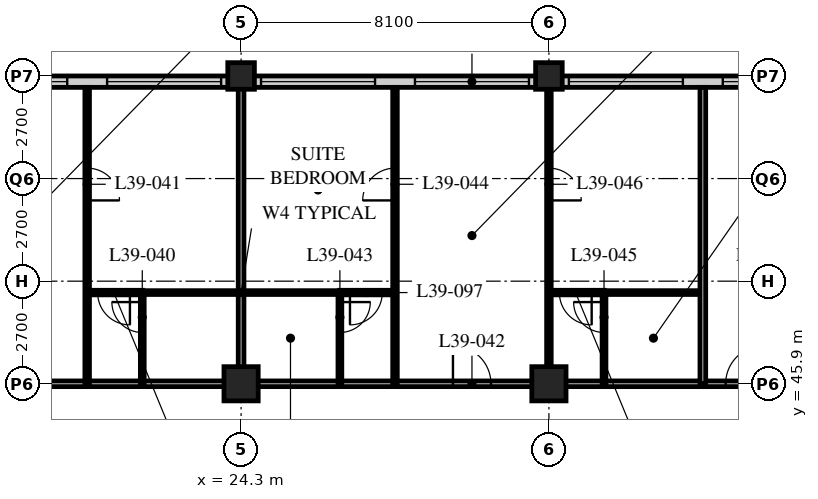
"""IFC4 building model, lengths in metres.
Left out: names, types, materials, properties, quantities, classifications, styles, units other than length and angle.
Written with IfcOpenShell. Run it as: python <this file> out.ifc"""

import sys

from ifc_helpers import new_model, si_unit, direction, frame, frame_2d, origin, origin_2d, place, context, subcontext, project, spatial, rectangle, hollow_rectangle, extrude, element, fill, save


model = new_model("IFC4")
c1 = context("Model", 3, precision=1e-05, world=origin(), true_north=direction((0.0, 1.0)))
c2 = subcontext(c1, "Body", "Model", "MODEL_VIEW")
j1 = project(units=[si_unit("LENGTHUNIT", "METRE"), si_unit("PLANEANGLEUNIT", "RADIAN")], contexts=[c1])
p1 = place(None, origin())
s1 = spatial("IfcSite", under=j1, at=p1, CompositionType="ELEMENT")
p2 = place(p1, origin())
s2 = spatial("IfcBuilding", under=s1, at=p2, CompositionType="ELEMENT")
p3 = place(p2, frame((0.0, 0.0, 151.0)))
s3 = spatial("IfcBuildingStorey", under=s2, at=p3, CompositionType="ELEMENT", Elevation=151.0)
p4 = place(p3, frame((24.3, 45.9, 0.0), z_axis=(0.0, 0.0, 1.0), x_axis=(1.0, 0.0, 0.0)))
e1 = element("IfcColumn", 1, at=p4, inside=s3, PredefinedType="COLUMN", context=c2, shape_type="SweptSolid", body=[
    extrude(hollow_rectangle(XDim=0.9, YDim=0.9, WallThickness=0.1, at=origin_2d()), origin(), (0.0, 0.0, 1.0), 3.4),
])
p5 = place(p3, frame((24.3, 54.0, 0.0), z_axis=(0.0, 0.0, 1.0), x_axis=(1.0, 0.0, 0.0)))
e2 = element("IfcColumn", 2, at=p5, inside=s3, PredefinedType="COLUMN", context=c2, shape_type="SweptSolid", body=[
    extrude(hollow_rectangle(XDim=0.7, YDim=0.7, WallThickness=0.07, at=origin_2d()), origin(), (0.0, 0.0, 1.0), 3.4),
])
p6 = place(p3, frame((32.4, 45.9, 0.0), z_axis=(0.0, 0.0, 1.0), x_axis=(1.0, 0.0, 0.0)))
e3 = element("IfcColumn", 3, at=p6, inside=s3, PredefinedType="COLUMN", context=c2, shape_type="SweptSolid", body=[
    extrude(hollow_rectangle(XDim=0.9, YDim=0.9, WallThickness=0.1, at=origin_2d()), origin(), (0.0, 0.0, 1.0), 3.4),
])
p7 = place(p3, frame((32.4, 54.0, 0.0), z_axis=(0.0, 0.0, 1.0), x_axis=(1.0, 0.0, 0.0)))
e4 = element("IfcColumn", 4, at=p7, inside=s3, PredefinedType="COLUMN", context=c2, shape_type="SweptSolid", body=[
    extrude(hollow_rectangle(XDim=0.7, YDim=0.7, WallThickness=0.07, at=origin_2d()), origin(), (0.0, 0.0, 1.0), 3.4),
])
p8 = place(p3, frame((48.3, 53.85, 0.0), z_axis=(0.0, 0.0, 1.0), x_axis=(-1.0, 0.0, 0.0)))
e5 = element("IfcWall", 5, at=p8, inside=s3, PredefinedType="SOLIDWALL", context=c2, shape_type="SweptSolid", body=[
    extrude(rectangle(XDim=40.2, YDim=0.3, at=frame_2d((20.1, 0.0))), origin(), (0.0, 0.0, 1.0), 3.19),
])
p9 = place(p8, frame((0.225, 0.0, 0.9)))
e6 = element("IfcOpeningElement", 6, at=p9, cuts=e5, PredefinedType="OPENING", context=c2, shape_type="SweptSolid", body=[
    extrude(rectangle(XDim=3.0, YDim=1.4, at=frame_2d((1.5, 0.7))), frame((0.0, 0.16, 0.0), z_axis=(0.0, -1.0, 0.0), x_axis=(1.0, 0.0, 0.0)), (0.0, 0.0, 1.0), 0.32),
])
p10 = place(p8, frame((4.275, 0.0, 0.9)))
e7 = element("IfcOpeningElement", 7, at=p10, cuts=e5, PredefinedType="OPENING", context=c2, shape_type="SweptSolid", body=[
    extrude(rectangle(XDim=3.0, YDim=1.4, at=frame_2d((1.5, 0.7))), frame((0.0, 0.16, 0.0), z_axis=(0.0, -1.0, 0.0), x_axis=(1.0, 0.0, 0.0)), (0.0, 0.0, 1.0), 0.32),
])
p11 = place(p8, frame((8.325, 0.0, 0.9)))
e8 = element("IfcOpeningElement", 8, at=p11, cuts=e5, PredefinedType="OPENING", context=c2, shape_type="SweptSolid", body=[
    extrude(rectangle(XDim=3.0, YDim=1.4, at=frame_2d((1.5, 0.7))), frame((0.0, 0.16, 0.0), z_axis=(0.0, -1.0, 0.0), x_axis=(1.0, 0.0, 0.0)), (0.0, 0.0, 1.0), 0.32),
])
p12 = place(p8, frame((12.375, 0.0, 0.9)))
e9 = element("IfcOpeningElement", 9, at=p12, cuts=e5, PredefinedType="OPENING", context=c2, shape_type="SweptSolid", body=[
    extrude(rectangle(XDim=3.0, YDim=1.4, at=frame_2d((1.5, 0.7))), frame((0.0, 0.16, 0.0), z_axis=(0.0, -1.0, 0.0), x_axis=(1.0, 0.0, 0.0)), (0.0, 0.0, 1.0), 0.32),
])
p13 = place(p8, frame((16.425, 0.0, 0.9)))
e10 = element("IfcOpeningElement", 10, at=p13, cuts=e5, PredefinedType="OPENING", context=c2, shape_type="SweptSolid", body=[
    extrude(rectangle(XDim=3.0, YDim=1.4, at=frame_2d((1.5, 0.7))), frame((0.0, 0.16, 0.0), z_axis=(0.0, -1.0, 0.0), x_axis=(1.0, 0.0, 0.0)), (0.0, 0.0, 1.0), 0.32),
])
p14 = place(p8, frame((20.475, 0.0, 0.9)))
e11 = element("IfcOpeningElement", 11, at=p14, cuts=e5, PredefinedType="OPENING", context=c2, shape_type="SweptSolid", body=[
    extrude(rectangle(XDim=3.0, YDim=1.4, at=frame_2d((1.5, 0.7))), frame((0.0, 0.16, 0.0), z_axis=(0.0, -1.0, 0.0), x_axis=(1.0, 0.0, 0.0)), (0.0, 0.0, 1.0), 0.32),
])
p15 = place(p8, frame((24.525, 0.0, 0.9)))
e12 = element("IfcOpeningElement", 12, at=p15, cuts=e5, PredefinedType="OPENING", context=c2, shape_type="SweptSolid", body=[
    extrude(rectangle(XDim=3.0, YDim=1.4, at=frame_2d((1.5, 0.7))), frame((0.0, 0.16, 0.0), z_axis=(0.0, -1.0, 0.0), x_axis=(1.0, 0.0, 0.0)), (0.0, 0.0, 1.0), 0.32),
])
p16 = place(p8, frame((28.575, 0.0, 0.9)))
e13 = element("IfcOpeningElement", 13, at=p16, cuts=e5, PredefinedType="OPENING", context=c2, shape_type="SweptSolid", body=[
    extrude(rectangle(XDim=3.0, YDim=1.4, at=frame_2d((1.5, 0.7))), frame((0.0, 0.16, 0.0), z_axis=(0.0, -1.0, 0.0), x_axis=(1.0, 0.0, 0.0)), (0.0, 0.0, 1.0), 0.32),
])
p17 = place(p8, frame((32.625, 0.0, 0.9)))
e14 = element("IfcOpeningElement", 14, at=p17, cuts=e5, PredefinedType="OPENING", context=c2, shape_type="SweptSolid", body=[
    extrude(rectangle(XDim=3.0, YDim=1.4, at=frame_2d((1.5, 0.7))), frame((0.0, 0.16, 0.0), z_axis=(0.0, -1.0, 0.0), x_axis=(1.0, 0.0, 0.0)), (0.0, 0.0, 1.0), 0.32),
])
p18 = place(p8, frame((36.675, 0.0, 0.9)))
e15 = element("IfcOpeningElement", 15, at=p18, cuts=e5, PredefinedType="OPENING", context=c2, shape_type="SweptSolid", body=[
    extrude(rectangle(XDim=3.0, YDim=1.4, at=frame_2d((1.5, 0.7))), frame((0.0, 0.16, 0.0), z_axis=(0.0, -1.0, 0.0), x_axis=(1.0, 0.0, 0.0)), (0.0, 0.0, 1.0), 0.32),
])
p19 = place(p3, frame((8.1, 45.9, 0.0), z_axis=(0.0, 0.0, 1.0), x_axis=(1.0, 0.0, 0.0)))
e16 = element("IfcWall", 16, at=p19, inside=s3, PredefinedType="PARTITIONING", context=c2, shape_type="SweptSolid", body=[
    extrude(rectangle(XDim=40.5, YDim=0.15, at=frame_2d((20.25, 0.0))), origin(), (0.0, 0.0, 1.0), 2.42),
])
p20 = place(p19, frame((9.625, 0.0, 0.0)))
e17 = element("IfcOpeningElement", 17, at=p20, cuts=e16, PredefinedType="OPENING", context=c2, shape_type="SweptSolid", body=[
    extrude(rectangle(XDim=1.0, YDim=2.1, at=frame_2d((0.5, 1.05))), frame((0.0, 0.085, 0.0), z_axis=(0.0, -1.0, 0.0), x_axis=(1.0, 0.0, 0.0)), (0.0, 0.0, 1.0), 0.17),
])
p21 = place(p19, frame((21.775, 0.0, 0.0)))
e18 = element("IfcOpeningElement", 18, at=p21, cuts=e16, PredefinedType="OPENING", context=c2, shape_type="SweptSolid", body=[
    extrude(rectangle(XDim=1.0, YDim=2.1, at=frame_2d((0.5, 1.05))), frame((0.0, 0.085, 0.0), z_axis=(0.0, -1.0, 0.0), x_axis=(1.0, 0.0, 0.0)), (0.0, 0.0, 1.0), 0.17),
])
p22 = place(p19, frame((28.95, 0.0, 0.0)))
e19 = element("IfcOpeningElement", 19, at=p22, cuts=e16, PredefinedType="OPENING", context=c2, shape_type="SweptSolid", body=[
    extrude(rectangle(XDim=1.0, YDim=2.1, at=frame_2d((0.5, 1.05))), frame((0.0, 0.085, 0.0), z_axis=(0.0, -1.0, 0.0), x_axis=(1.0, 0.0, 0.0)), (0.0, 0.0, 1.0), 0.17),
])
p23 = place(p19, frame((34.85, 0.0, 0.0)))
e20 = element("IfcOpeningElement", 20, at=p23, cuts=e16, PredefinedType="OPENING", context=c2, shape_type="SweptSolid", body=[
    extrude(rectangle(XDim=1.0, YDim=2.1, at=frame_2d((0.5, 1.05))), frame((0.0, 0.085, 0.0), z_axis=(0.0, -1.0, 0.0), x_axis=(1.0, 0.0, 0.0)), (0.0, 0.0, 1.0), 0.17),
])
p24 = place(p19, frame((36.875, 0.0, 0.0)))
e21 = element("IfcOpeningElement", 21, at=p24, cuts=e16, PredefinedType="OPENING", context=c2, shape_type="SweptSolid", body=[
    extrude(rectangle(XDim=1.0, YDim=2.1, at=frame_2d((0.5, 1.05))), frame((0.0, 0.085, 0.0), z_axis=(0.0, -1.0, 0.0), x_axis=(1.0, 0.0, 0.0)), (0.0, 0.0, 1.0), 0.17),
])
p25 = place(p19, frame((2.625, 0.0, 0.0)))
e22 = element("IfcOpeningElement", 22, at=p25, cuts=e16, PredefinedType="OPENING", context=c2, shape_type="SweptSolid", body=[
    extrude(rectangle(XDim=1.0, YDim=2.1, at=frame_2d((0.5, 1.05))), frame((0.0, 0.085, 0.0), z_axis=(0.0, -1.0, 0.0), x_axis=(1.0, 0.0, 0.0)), (0.0, 0.0, 1.0), 0.17),
])
p26 = place(p3, frame((21.7, 48.3, 0.0), z_axis=(0.0, 0.0, 1.0), x_axis=(1.0, 0.0, 0.0)))
e23 = element("IfcWall", 23, at=p26, inside=s3, PredefinedType="PARTITIONING", context=c2, shape_type="SweptSolid", body=[
    extrude(rectangle(XDim=5.2, YDim=0.1, at=frame_2d((2.6, 0.0))), origin(), (0.0, 0.0, 1.0), 3.19),
])
p27 = place(p3, frame((21.7, 45.9, 0.0), z_axis=(0.0, 0.0, 1.0), x_axis=(0.0, 1.0, 0.0)))
e24 = element("IfcWall", 24, at=p27, inside=s3, PredefinedType="PARTITIONING", context=c2, shape_type="SweptSolid", body=[
    extrude(rectangle(XDim=2.4, YDim=0.1, at=frame_2d((1.2, 0.0))), origin(), (0.0, 0.0, 1.0), 3.19),
])
p28 = place(p27, frame((1.35, 0.0, 0.0)))
e25 = element("IfcOpeningElement", 25, at=p28, cuts=e24, PredefinedType="OPENING", context=c2, shape_type="SweptSolid", body=[
    extrude(rectangle(XDim=0.8, YDim=2.1, at=frame_2d((0.4, 1.05))), frame((0.0, 0.06, 0.0), z_axis=(0.0, -1.0, 0.0), x_axis=(1.0, 0.0, 0.0)), (0.0, 0.0, 1.0), 0.12),
])
p29 = place(p3, frame((20.25, 45.9, 0.0), z_axis=(0.0, 0.0, 1.0), x_axis=(0.0, 1.0, 0.0)))
e26 = element("IfcWall", 26, at=p29, inside=s3, PredefinedType="PARTITIONING", context=c2, shape_type="SweptSolid", body=[
    extrude(rectangle(XDim=7.8, YDim=0.12, at=frame_2d((3.9, 0.0))), origin(), (0.0, 0.0, 1.0), 3.19),
])
p30 = place(p29, frame((4.825, 0.0, 0.0)))
e27 = element("IfcOpeningElement", 27, at=p30, cuts=e26, PredefinedType="OPENING", context=c2, shape_type="SweptSolid", body=[
    extrude(rectangle(XDim=0.85, YDim=2.1, at=frame_2d((0.425, 1.05))), frame((0.0, 0.07, 0.0), z_axis=(0.0, -1.0, 0.0), x_axis=(1.0, 0.0, 0.0)), (0.0, 0.0, 1.0), 0.14),
])
p31 = place(p3, frame((24.3, 45.9, 0.0), z_axis=(0.0, 0.0, 1.0), x_axis=(0.0, 1.0, 0.0)))
e28 = element("IfcWall", 28, at=p31, inside=s3, PredefinedType="PARTITIONING", context=c2, shape_type="SweptSolid", body=[
    extrude(rectangle(XDim=7.8, YDim=0.15, at=frame_2d((3.9, 0.0))), origin(), (0.0, 0.0, 1.0), 2.42),
])
p32 = place(p3, frame((26.9, 45.9, 0.0), z_axis=(0.0, 0.0, 1.0), x_axis=(0.0, 1.0, 0.0)))
e29 = element("IfcWall", 29, at=p32, inside=s3, PredefinedType="PARTITIONING", context=c2, shape_type="SweptSolid", body=[
    extrude(rectangle(XDim=2.4, YDim=0.1, at=frame_2d((1.2, 0.0))), origin(), (0.0, 0.0, 1.0), 3.19),
])
p33 = place(p32, frame((1.35, 0.0, 0.0)))
e30 = element("IfcOpeningElement", 30, at=p33, cuts=e29, PredefinedType="OPENING", context=c2, shape_type="SweptSolid", body=[
    extrude(rectangle(XDim=0.8, YDim=2.1, at=frame_2d((0.4, 1.05))), frame((0.0, 0.06, 0.0), z_axis=(0.0, -1.0, 0.0), x_axis=(1.0, 0.0, 0.0)), (0.0, 0.0, 1.0), 0.12),
])
p34 = place(p3, frame((28.35, 45.9, 0.0), z_axis=(0.0, 0.0, 1.0), x_axis=(0.0, 1.0, 0.0)))
e31 = element("IfcWall", 31, at=p34, inside=s3, PredefinedType="PARTITIONING", context=c2, shape_type="SweptSolid", body=[
    extrude(rectangle(XDim=7.8, YDim=0.12, at=frame_2d((3.9, 0.0))), origin(), (0.0, 0.0, 1.0), 3.19),
])
p35 = place(p34, frame((4.825, 0.0, 0.0)))
e32 = element("IfcOpeningElement", 32, at=p35, cuts=e31, PredefinedType="OPENING", context=c2, shape_type="SweptSolid", body=[
    extrude(rectangle(XDim=0.85, YDim=2.1, at=frame_2d((0.425, 1.05))), frame((0.0, 0.07, 0.0), z_axis=(0.0, -1.0, 0.0), x_axis=(1.0, 0.0, 0.0)), (0.0, 0.0, 1.0), 0.14),
])
p36 = place(p3, frame((33.85, 48.3, 0.0), z_axis=(0.0, 0.0, 1.0), x_axis=(1.0, 0.0, 0.0)))
e33 = element("IfcWall", 33, at=p36, inside=s3, PredefinedType="PARTITIONING", context=c2, shape_type="SweptSolid", body=[
    extrude(rectangle(XDim=2.6, YDim=0.1, at=frame_2d((1.3, 0.0))), origin(), (0.0, 0.0, 1.0), 3.19),
])
p37 = place(p3, frame((33.85, 45.9, 0.0), z_axis=(0.0, 0.0, 1.0), x_axis=(0.0, 1.0, 0.0)))
e34 = element("IfcWall", 34, at=p37, inside=s3, PredefinedType="PARTITIONING", context=c2, shape_type="SweptSolid", body=[
    extrude(rectangle(XDim=2.4, YDim=0.1, at=frame_2d((1.2, 0.0))), origin(), (0.0, 0.0, 1.0), 3.19),
])
p38 = place(p37, frame((1.35, 0.0, 0.0)))
e35 = element("IfcOpeningElement", 35, at=p38, cuts=e34, PredefinedType="OPENING", context=c2, shape_type="SweptSolid", body=[
    extrude(rectangle(XDim=0.8, YDim=2.1, at=frame_2d((0.4, 1.05))), frame((0.0, 0.06, 0.0), z_axis=(0.0, -1.0, 0.0), x_axis=(1.0, 0.0, 0.0)), (0.0, 0.0, 1.0), 0.12),
])
p39 = place(p3, frame((32.4, 45.9, 0.0), z_axis=(0.0, 0.0, 1.0), x_axis=(0.0, 1.0, 0.0)))
e36 = element("IfcWall", 36, at=p39, inside=s3, PredefinedType="PARTITIONING", context=c2, shape_type="SweptSolid", body=[
    extrude(rectangle(XDim=7.8, YDim=0.12, at=frame_2d((3.9, 0.0))), origin(), (0.0, 0.0, 1.0), 2.42),
])
p40 = place(p39, frame((4.825, 0.0, 0.0)))
e37 = element("IfcOpeningElement", 37, at=p40, cuts=e36, PredefinedType="OPENING", context=c2, shape_type="SweptSolid", body=[
    extrude(rectangle(XDim=0.85, YDim=2.1, at=frame_2d((0.425, 1.05))), frame((0.0, 0.07, 0.0), z_axis=(0.0, -1.0, 0.0), x_axis=(1.0, 0.0, 0.0)), (0.0, 0.0, 1.0), 0.14),
])
p41 = place(p3, frame((36.45, 45.9, 0.0), z_axis=(0.0, 0.0, 1.0), x_axis=(0.0, 1.0, 0.0)))
e38 = element("IfcWall", 38, at=p41, inside=s3, PredefinedType="PARTITIONING", context=c2, shape_type="SweptSolid", body=[
    extrude(rectangle(XDim=7.8, YDim=0.15, at=frame_2d((3.9, 0.0))), origin(), (0.0, 0.0, 1.0), 3.19),
])
p42 = place(p3, frame((20.25, 48.3, 0.0), z_axis=(0.0, 0.0, 1.0), x_axis=(1.0, 0.0, 0.0)))
e39 = element("IfcWall", 39, at=p42, inside=s3, PredefinedType="PARTITIONING", context=c2, shape_type="SweptSolid", body=[
    extrude(rectangle(XDim=1.46, YDim=0.12, at=frame_2d((0.73, 0.0))), origin(), (0.0, 0.0, 1.0), 3.19),
])
p43 = place(p42, frame((0.275, 0.0, 0.0)))
e40 = element("IfcOpeningElement", 40, at=p43, cuts=e39, PredefinedType="OPENING", context=c2, shape_type="SweptSolid", body=[
    extrude(rectangle(XDim=0.85, YDim=2.1, at=frame_2d((0.425, 1.05))), frame((0.0, 0.07, 0.0), z_axis=(0.0, -1.0, 0.0), x_axis=(1.0, 0.0, 0.0)), (0.0, 0.0, 1.0), 0.14),
])
p44 = place(p3, frame((26.89, 48.3, 0.0), z_axis=(0.0, 0.0, 1.0), x_axis=(1.0, 0.0, 0.0)))
e41 = element("IfcWall", 41, at=p44, inside=s3, PredefinedType="PARTITIONING", context=c2, shape_type="SweptSolid", body=[
    extrude(rectangle(XDim=1.46, YDim=0.12, at=frame_2d((0.73, 0.0))), origin(), (0.0, 0.0, 1.0), 3.19),
])
p45 = place(p44, frame((0.275, 0.0, 0.0)))
e42 = element("IfcOpeningElement", 42, at=p45, cuts=e41, PredefinedType="OPENING", context=c2, shape_type="SweptSolid", body=[
    extrude(rectangle(XDim=0.85, YDim=2.1, at=frame_2d((0.425, 1.05))), frame((0.0, 0.07, 0.0), z_axis=(0.0, -1.0, 0.0), x_axis=(1.0, 0.0, 0.0)), (0.0, 0.0, 1.0), 0.14),
])
p46 = place(p3, frame((32.4, 48.3, 0.0), z_axis=(0.0, 0.0, 1.0), x_axis=(1.0, 0.0, 0.0)))
e43 = element("IfcWall", 43, at=p46, inside=s3, PredefinedType="PARTITIONING", context=c2, shape_type="SweptSolid", body=[
    extrude(rectangle(XDim=1.46, YDim=0.12, at=frame_2d((0.73, 0.0))), origin(), (0.0, 0.0, 1.0), 3.19),
])
p47 = place(p46, frame((0.275, 0.0, 0.0)))
e44 = element("IfcOpeningElement", 44, at=p47, cuts=e43, PredefinedType="OPENING", context=c2, shape_type="SweptSolid", body=[
    extrude(rectangle(XDim=0.85, YDim=2.1, at=frame_2d((0.425, 1.05))), frame((0.0, 0.07, 0.0), z_axis=(0.0, -1.0, 0.0), x_axis=(1.0, 0.0, 0.0)), (0.0, 0.0, 1.0), 0.14),
])
p48 = place(p11, origin())
e45 = element("IfcWindow", 45, at=p48, inside=s3, PartitioningType="SINGLE_PANEL", PredefinedType="WINDOW", context=c2, shape_type="SweptSolid", body=[
    extrude(rectangle(XDim=3.0, YDim=1.4, at=frame_2d((1.5, 0.7))), frame((0.0, 0.03, 0.0), z_axis=(0.0, -1.0, 0.0), x_axis=(1.0, 0.0, 0.0)), (0.0, 0.0, 1.0), 0.06),
])
fill(e8, e45)
p49 = place(p12, origin())
e46 = element("IfcWindow", 46, at=p49, inside=s3, PartitioningType="SINGLE_PANEL", PredefinedType="WINDOW", context=c2, shape_type="SweptSolid", body=[
    extrude(rectangle(XDim=3.0, YDim=1.4, at=frame_2d((1.5, 0.7))), frame((0.0, 0.03, 0.0), z_axis=(0.0, -1.0, 0.0), x_axis=(1.0, 0.0, 0.0)), (0.0, 0.0, 1.0), 0.06),
])
fill(e9, e46)
p50 = place(p13, origin())
e47 = element("IfcWindow", 47, at=p50, inside=s3, PartitioningType="SINGLE_PANEL", PredefinedType="WINDOW", context=c2, shape_type="SweptSolid", body=[
    extrude(rectangle(XDim=3.0, YDim=1.4, at=frame_2d((1.5, 0.7))), frame((0.0, 0.03, 0.0), z_axis=(0.0, -1.0, 0.0), x_axis=(1.0, 0.0, 0.0)), (0.0, 0.0, 1.0), 0.06),
])
fill(e10, e47)
p51 = place(p14, origin())
e48 = element("IfcWindow", 48, at=p51, inside=s3, PartitioningType="SINGLE_PANEL", PredefinedType="WINDOW", context=c2, shape_type="SweptSolid", body=[
    extrude(rectangle(XDim=3.0, YDim=1.4, at=frame_2d((1.5, 0.7))), frame((0.0, 0.03, 0.0), z_axis=(0.0, -1.0, 0.0), x_axis=(1.0, 0.0, 0.0)), (0.0, 0.0, 1.0), 0.06),
])
fill(e11, e48)
p52 = place(p15, origin())
e49 = element("IfcWindow", 49, at=p52, inside=s3, PartitioningType="SINGLE_PANEL", PredefinedType="WINDOW", context=c2, shape_type="SweptSolid", body=[
    extrude(rectangle(XDim=3.0, YDim=1.4, at=frame_2d((1.5, 0.7))), frame((0.0, 0.03, 0.0), z_axis=(0.0, -1.0, 0.0), x_axis=(1.0, 0.0, 0.0)), (0.0, 0.0, 1.0), 0.06),
])
fill(e12, e49)
p53 = place(p16, origin())
e50 = element("IfcWindow", 50, at=p53, inside=s3, PartitioningType="SINGLE_PANEL", PredefinedType="WINDOW", context=c2, shape_type="SweptSolid", body=[
    extrude(rectangle(XDim=3.0, YDim=1.4, at=frame_2d((1.5, 0.7))), frame((0.0, 0.03, 0.0), z_axis=(0.0, -1.0, 0.0), x_axis=(1.0, 0.0, 0.0)), (0.0, 0.0, 1.0), 0.06),
])
fill(e13, e50)
p54 = place(p28, origin())
e51 = element("IfcDoor", 51, at=p54, inside=s3, OperationType="SINGLE_SWING_RIGHT", PredefinedType="DOOR", context=c2, shape_type="SweptSolid", body=[
    extrude(rectangle(XDim=0.8, YDim=2.1, at=frame_2d((0.4, 1.05))), frame((0.0, 0.025, 0.0), z_axis=(0.0, -1.0, 0.0), x_axis=(1.0, 0.0, 0.0)), (0.0, 0.0, 1.0), 0.05),
])
fill(e25, e51)
p55 = place(p30, origin())
e52 = element("IfcDoor", 52, at=p55, inside=s3, OperationType="SINGLE_SWING_RIGHT", PredefinedType="DOOR", context=c2, shape_type="SweptSolid", body=[
    extrude(rectangle(XDim=0.85, YDim=2.1, at=frame_2d((0.425, 1.05))), frame((0.0, 0.025, 0.0), z_axis=(0.0, -1.0, 0.0), x_axis=(1.0, 0.0, 0.0)), (0.0, 0.0, 1.0), 0.05),
])
fill(e27, e52)
p56 = place(p21, origin())
e53 = element("IfcDoor", 53, at=p56, inside=s3, OperationType="SINGLE_SWING_LEFT", PredefinedType="DOOR", context=c2, shape_type="SweptSolid", body=[
    extrude(rectangle(XDim=1.0, YDim=2.1, at=frame_2d((0.5, 1.05))), frame((0.0, 0.025, 0.0), z_axis=(0.0, -1.0, 0.0), x_axis=(1.0, 0.0, 0.0)), (0.0, 0.0, 1.0), 0.05),
])
fill(e18, e53)
p57 = place(p33, origin())
e54 = element("IfcDoor", 54, at=p57, inside=s3, OperationType="SINGLE_SWING_LEFT", PredefinedType="DOOR", context=c2, shape_type="SweptSolid", body=[
    extrude(rectangle(XDim=0.8, YDim=2.1, at=frame_2d((0.4, 1.05))), frame((0.0, 0.025, 0.0), z_axis=(0.0, -1.0, 0.0), x_axis=(1.0, 0.0, 0.0)), (0.0, 0.0, 1.0), 0.05),
])
fill(e30, e54)
p58 = place(p35, origin())
e55 = element("IfcDoor", 55, at=p58, inside=s3, OperationType="SINGLE_SWING_LEFT", PredefinedType="DOOR", context=c2, shape_type="SweptSolid", body=[
    extrude(rectangle(XDim=0.85, YDim=2.1, at=frame_2d((0.425, 1.05))), frame((0.0, 0.025, 0.0), z_axis=(0.0, -1.0, 0.0), x_axis=(1.0, 0.0, 0.0)), (0.0, 0.0, 1.0), 0.05),
])
fill(e32, e55)
p59 = place(p38, origin())
e56 = element("IfcDoor", 56, at=p59, inside=s3, OperationType="SINGLE_SWING_RIGHT", PredefinedType="DOOR", context=c2, shape_type="SweptSolid", body=[
    extrude(rectangle(XDim=0.8, YDim=2.1, at=frame_2d((0.4, 1.05))), frame((0.0, 0.025, 0.0), z_axis=(0.0, -1.0, 0.0), x_axis=(1.0, 0.0, 0.0)), (0.0, 0.0, 1.0), 0.05),
])
fill(e35, e56)
p60 = place(p40, origin())
e57 = element("IfcDoor", 57, at=p60, inside=s3, OperationType="SINGLE_SWING_RIGHT", PredefinedType="DOOR", context=c2, shape_type="SweptSolid", body=[
    extrude(rectangle(XDim=0.85, YDim=2.1, at=frame_2d((0.425, 1.05))), frame((0.0, 0.025, 0.0), z_axis=(0.0, -1.0, 0.0), x_axis=(1.0, 0.0, 0.0)), (0.0, 0.0, 1.0), 0.05),
])
fill(e37, e57)
p61 = place(p22, origin())
e58 = element("IfcDoor", 58, at=p61, inside=s3, OperationType="SINGLE_SWING_RIGHT", PredefinedType="DOOR", context=c2, shape_type="SweptSolid", body=[
    extrude(rectangle(XDim=1.0, YDim=2.1, at=frame_2d((0.5, 1.05))), frame((0.0, 0.025, 0.0), z_axis=(0.0, -1.0, 0.0), x_axis=(1.0, 0.0, 0.0)), (0.0, 0.0, 1.0), 0.05),
])
fill(e19, e58)
p62 = place(p43, origin())
e59 = element("IfcDoor", 59, at=p62, inside=s3, OperationType="SINGLE_SWING_LEFT", PredefinedType="DOOR", context=c2, shape_type="SweptSolid", body=[
    extrude(rectangle(XDim=0.85, YDim=2.1, at=frame_2d((0.425, 1.05))), frame((0.0, 0.025, 0.0), z_axis=(0.0, -1.0, 0.0), x_axis=(1.0, 0.0, 0.0)), (0.0, 0.0, 1.0), 0.05),
])
fill(e40, e59)
p63 = place(p45, origin())
e60 = element("IfcDoor", 60, at=p63, inside=s3, OperationType="SINGLE_SWING_RIGHT", PredefinedType="DOOR", context=c2, shape_type="SweptSolid", body=[
    extrude(rectangle(XDim=0.85, YDim=2.1, at=frame_2d((0.425, 1.05))), frame((0.0, 0.025, 0.0), z_axis=(0.0, -1.0, 0.0), x_axis=(1.0, 0.0, 0.0)), (0.0, 0.0, 1.0), 0.05),
])
fill(e42, e60)
p64 = place(p47, origin())
e61 = element("IfcDoor", 61, at=p64, inside=s3, OperationType="SINGLE_SWING_LEFT", PredefinedType="DOOR", context=c2, shape_type="SweptSolid", body=[
    extrude(rectangle(XDim=0.85, YDim=2.1, at=frame_2d((0.425, 1.05))), frame((0.0, 0.025, 0.0), z_axis=(0.0, -1.0, 0.0), x_axis=(1.0, 0.0, 0.0)), (0.0, 0.0, 1.0), 0.05),
])
fill(e44, e61)
save(model, sys.argv[1])
